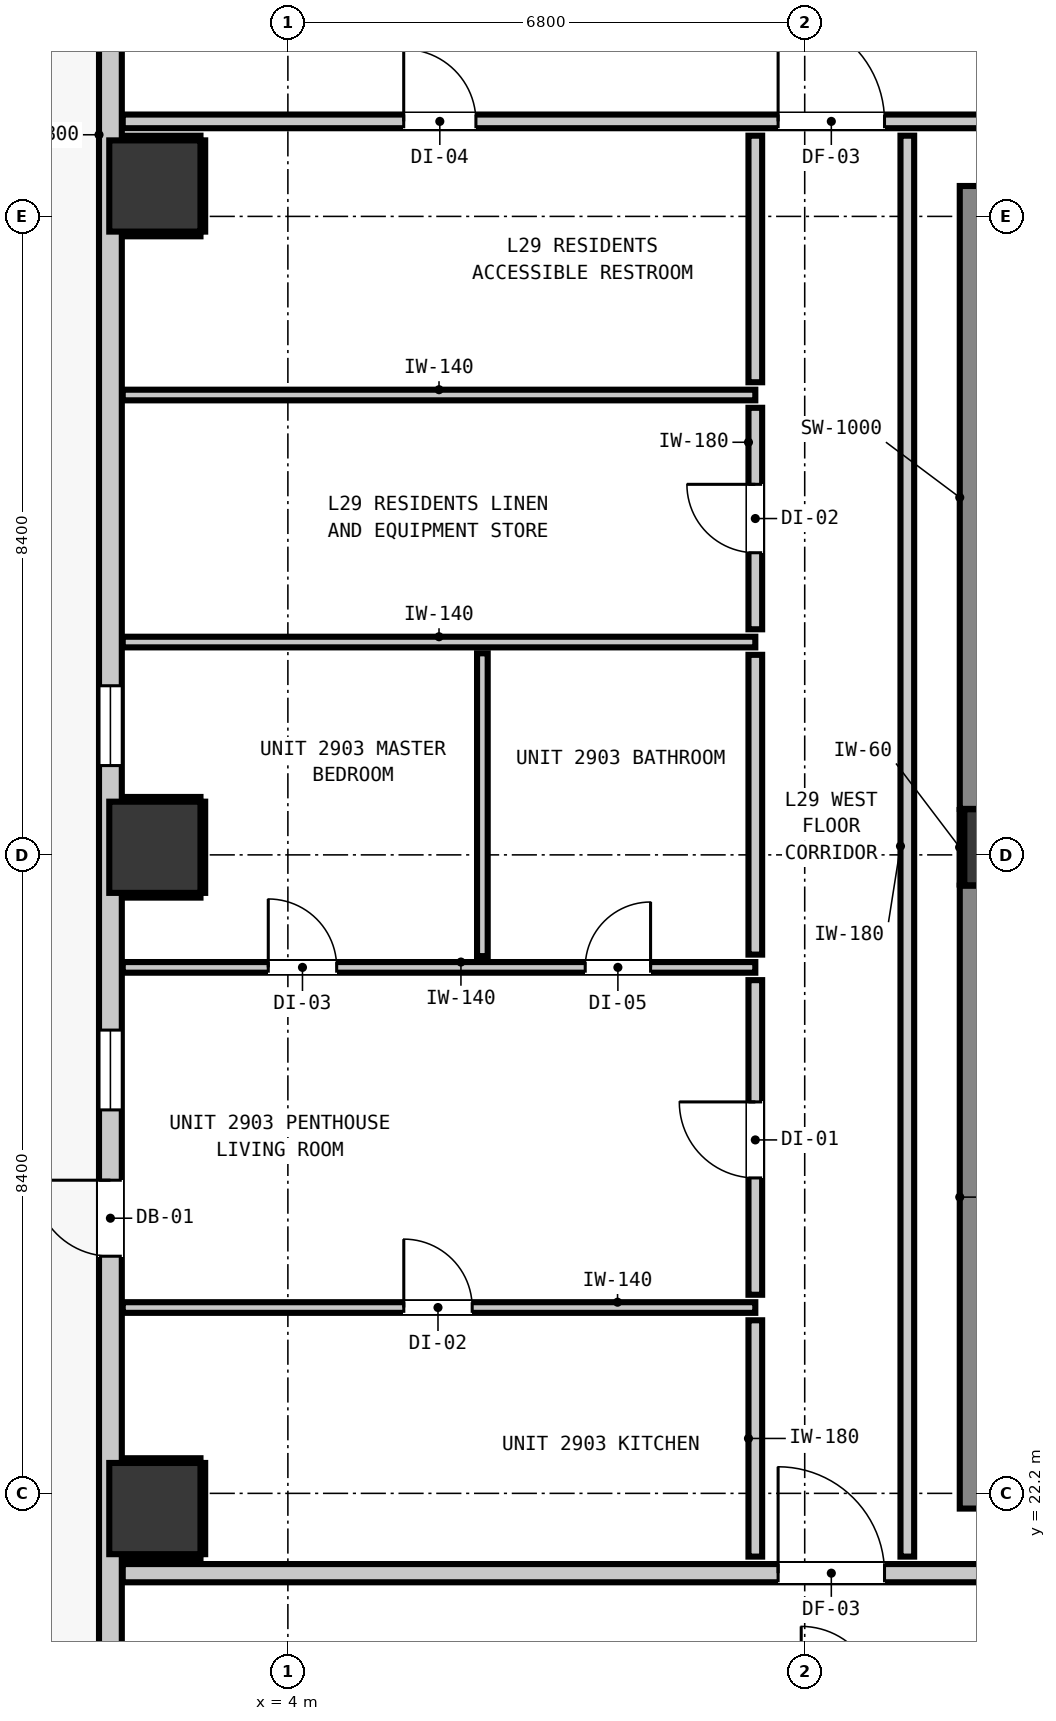
"""IFC4 building model, lengths in metres.
Left out: names, types, materials, properties, quantities, classifications, styles, units other than length and angle.
Written with IfcOpenShell. Run it as: python <this file> out.ifc"""

import sys

from ifc_helpers import new_model, si_unit, direction, frame, frame_2d, origin, origin_2d, place, context, subcontext, project, spatial, rectangle, extrude, element, fill, save


model = new_model("IFC4")
c1 = context("Model", 3, precision=1e-05, world=origin(), true_north=direction((0.0, 1.0)))
c2 = subcontext(c1, "Body", "Model", "MODEL_VIEW")
j1 = project(units=[si_unit("LENGTHUNIT", "METRE"), si_unit("PLANEANGLEUNIT", "RADIAN")], contexts=[c1])
p1 = place(None, origin())
s1 = spatial("IfcSite", under=j1, at=p1, CompositionType="ELEMENT")
p2 = place(p1, origin())
s2 = spatial("IfcBuilding", under=s1, at=p2, CompositionType="ELEMENT")
p3 = place(p2, frame((0.0, 0.0, 102.76)))
s3 = spatial("IfcBuildingStorey", under=s2, at=p3, CompositionType="ELEMENT", Elevation=102.76)
p4 = place(p3, frame((13.4, 30.7, 0.0), z_axis=(0.0, 0.0, 1.0), x_axis=(1.0, 0.0, 0.0)))
e1 = element("IfcColumn", 1, at=p4, inside=s3, PredefinedType="COLUMN", context=c2, shape_type="SweptSolid", body=[
    extrude(rectangle(XDim=1.0, YDim=1.0, at=origin_2d()), origin(), (0.0, 0.0, 1.0), 3.32),
])
p5 = place(p3, frame((13.34, 22.0, 0.0), z_axis=(0.0, 0.0, 1.0), x_axis=(0.0, 1.0, 0.0)))
e2 = element("IfcWall", 2, at=p5, inside=s3, PredefinedType="SHEAR", context=c2, shape_type="SweptSolid", body=[
    extrude(rectangle(XDim=8.195, YDim=1.0, at=frame_2d((4.098, 0.0))), origin(), (0.0, 0.0, 1.0), 3.32),
])
p6 = place(p3, frame((13.34, 31.205, 0.0), z_axis=(0.0, 0.0, 1.0), x_axis=(0.0, 1.0, 0.0)))
e3 = element("IfcWall", 3, at=p6, inside=s3, PredefinedType="SHEAR", context=c2, shape_type="SweptSolid", body=[
    extrude(rectangle(XDim=8.195, YDim=1.0, at=frame_2d((4.097, 0.0))), origin(), (0.0, 0.0, 1.0), 3.32),
])
for number, where, z_axis, x_axis in (
    (4, (2.25, 22.0, 0.0), (0.0, 0.0, 1.0), (1.0, 0.0, 0.0)),
    (5, (2.25, 30.7, 0.0), (0.0, 0.0, 1.0), (1.0, 0.0, 0.0)),
    (6, (2.25, 39.4, 0.0), (0.0, 0.0, 1.0), (1.0, 0.0, 0.0)),
):
    element("IfcColumn", number, at=place(p3, frame(where, z_axis=z_axis, x_axis=x_axis)), inside=s3, PredefinedType="COLUMN", context=c2, shape_type="SweptSolid", body=[
        extrude(rectangle(XDim=1.2, YDim=1.2, at=origin_2d()), origin(), (0.0, 0.0, 1.0), 2.9),
    ])
p7 = place(p3, frame((1.665, 16.365, 0.0), z_axis=(0.0, 0.0, 1.0), x_axis=(0.0, 1.0, 0.0)))
e7 = element("IfcWall", 7, at=p7, inside=s3, PredefinedType="STANDARD", context=c2, shape_type="SweptSolid", body=[
    extrude(rectangle(XDim=34.67, YDim=0.3, at=frame_2d((17.335, 0.0))), origin(), (0.0, 0.0, 1.0), 2.9),
])
p8 = place(p7, frame((8.955, 0.0, 0.0)))
e8 = element("IfcOpeningElement", 8, at=p8, cuts=e7, PredefinedType="OPENING", context=c2, shape_type="SweptSolid", body=[
    extrude(rectangle(XDim=1.0, YDim=2.15, at=frame_2d((0.5, 1.075))), frame((0.0, 0.16, 0.0), z_axis=(0.0, -1.0, 0.0), x_axis=(1.0, 0.0, 0.0)), (0.0, 0.0, 1.0), 0.32),
])
p9 = place(p7, frame((30.958, 0.0, 0.85)))
e9 = element("IfcOpeningElement", 9, at=p9, cuts=e7, PredefinedType="OPENING", context=c2, shape_type="SweptSolid", body=[
    extrude(rectangle(XDim=1.05, YDim=1.65, at=frame_2d((0.525, 0.825))), frame((0.0, 0.16, 0.0), z_axis=(0.0, -1.0, 0.0), x_axis=(1.0, 0.0, 0.0)), (0.0, 0.0, 1.0), 0.32),
])
p10 = place(p7, frame((10.88, 0.0, 0.85)))
e10 = element("IfcOpeningElement", 10, at=p10, cuts=e7, PredefinedType="OPENING", context=c2, shape_type="SweptSolid", body=[
    extrude(rectangle(XDim=1.05, YDim=1.65, at=frame_2d((0.525, 0.825))), frame((0.0, 0.16, 0.0), z_axis=(0.0, -1.0, 0.0), x_axis=(1.0, 0.0, 0.0)), (0.0, 0.0, 1.0), 0.32),
])
p11 = place(p7, frame((15.41, 0.0, 0.85)))
e11 = element("IfcOpeningElement", 11, at=p11, cuts=e7, PredefinedType="OPENING", context=c2, shape_type="SweptSolid", body=[
    extrude(rectangle(XDim=1.05, YDim=1.65, at=frame_2d((0.525, 0.825))), frame((0.0, 0.16, 0.0), z_axis=(0.0, -1.0, 0.0), x_axis=(1.0, 0.0, 0.0)), (0.0, 0.0, 1.0), 0.32),
])
p12 = place(p3, frame((1.827, 21.15, 0.0), z_axis=(0.0, 0.0, 1.0), x_axis=(1.0, 0.0, 0.0)))
e12 = element("IfcWall", 12, at=p12, inside=s3, PredefinedType="PARTITIONING", context=c2, shape_type="SweptSolid", body=[
    extrude(rectangle(XDim=42.146, YDim=0.24, at=frame_2d((21.073, 0.0))), origin(), (0.0, 0.0, 1.0), 2.9),
])
p13 = place(p12, frame((16.383, 0.0, 0.0)))
e13 = element("IfcOpeningElement", 13, at=p13, cuts=e12, PredefinedType="OPENING", context=c2, shape_type="SweptSolid", body=[
    extrude(rectangle(XDim=1.1, YDim=2.15, at=frame_2d((0.55, 1.075))), frame((0.0, 0.13, 0.0), z_axis=(0.0, -1.0, 0.0), x_axis=(1.0, 0.0, 0.0)), (0.0, 0.0, 1.0), 0.26),
])
p14 = place(p12, frame((8.623, 0.0, 0.0)))
e14 = element("IfcOpeningElement", 14, at=p14, cuts=e12, PredefinedType="OPENING", context=c2, shape_type="SweptSolid", body=[
    extrude(rectangle(XDim=1.4, YDim=2.15, at=frame_2d((0.7, 1.075))), frame((0.0, 0.13, 0.0), z_axis=(0.0, -1.0, 0.0), x_axis=(1.0, 0.0, 0.0)), (0.0, 0.0, 1.0), 0.26),
])
p15 = place(p12, frame((36.223, 0.0, 0.0)))
e15 = element("IfcOpeningElement", 15, at=p15, cuts=e12, PredefinedType="OPENING", context=c2, shape_type="SweptSolid", body=[
    extrude(rectangle(XDim=1.4, YDim=2.15, at=frame_2d((0.7, 1.075))), frame((0.0, 0.13, 0.0), z_axis=(0.0, -1.0, 0.0), x_axis=(1.0, 0.0, 0.0)), (0.0, 0.0, 1.0), 0.26),
])
p16 = place(p3, frame((1.827, 40.25, 0.0), z_axis=(0.0, 0.0, 1.0), x_axis=(1.0, 0.0, 0.0)))
e16 = element("IfcWall", 16, at=p16, inside=s3, PredefinedType="PARTITIONING", context=c2, shape_type="SweptSolid", body=[
    extrude(rectangle(XDim=42.146, YDim=0.18, at=frame_2d((21.073, 0.0))), origin(), (0.0, 0.0, 1.0), 2.9),
])
p17 = place(p16, frame((15.608, 0.0, 0.0)))
e17 = element("IfcOpeningElement", 17, at=p17, cuts=e16, PredefinedType="OPENING", context=c2, shape_type="SweptSolid", body=[
    extrude(rectangle(XDim=1.4, YDim=2.15, at=frame_2d((0.7, 1.075))), frame((0.0, 0.1, 0.0), z_axis=(0.0, -1.0, 0.0), x_axis=(1.0, 0.0, 0.0)), (0.0, 0.0, 1.0), 0.2),
])
p18 = place(p16, frame((8.623, 0.0, 0.0)))
e18 = element("IfcOpeningElement", 18, at=p18, cuts=e16, PredefinedType="OPENING", context=c2, shape_type="SweptSolid", body=[
    extrude(rectangle(XDim=1.4, YDim=2.15, at=frame_2d((0.7, 1.075))), frame((0.0, 0.1, 0.0), z_axis=(0.0, -1.0, 0.0), x_axis=(1.0, 0.0, 0.0)), (0.0, 0.0, 1.0), 0.2),
])
p19 = place(p16, frame((36.223, 0.0, 0.0)))
e19 = element("IfcOpeningElement", 19, at=p19, cuts=e16, PredefinedType="OPENING", context=c2, shape_type="SweptSolid", body=[
    extrude(rectangle(XDim=1.4, YDim=2.15, at=frame_2d((0.7, 1.075))), frame((0.0, 0.1, 0.0), z_axis=(0.0, -1.0, 0.0), x_axis=(1.0, 0.0, 0.0)), (0.0, 0.0, 1.0), 0.2),
])
p20 = place(p16, frame((3.697, 0.0, 0.0)))
e20 = element("IfcOpeningElement", 20, at=p20, cuts=e16, PredefinedType="OPENING", context=c2, shape_type="SweptSolid", body=[
    extrude(rectangle(XDim=0.95, YDim=2.1, at=frame_2d((0.475, 1.05))), frame((0.0, 0.1, 0.0), z_axis=(0.0, -1.0, 0.0), x_axis=(1.0, 0.0, 0.0)), (0.0, 0.0, 1.0), 0.2),
])
p21 = place(p16, frame((39.574, 0.0, 0.0)))
e21 = element("IfcOpeningElement", 21, at=p21, cuts=e16, PredefinedType="OPENING", context=c2, shape_type="SweptSolid", body=[
    extrude(rectangle(XDim=0.9, YDim=2.1, at=frame_2d((0.45, 1.05))), frame((0.0, 0.1, 0.0), z_axis=(0.0, -1.0, 0.0), x_axis=(1.0, 0.0, 0.0)), (0.0, 0.0, 1.0), 0.2),
])
p22 = place(p3, frame((1.827, 24.645, 0.0), z_axis=(0.0, 0.0, 1.0), x_axis=(1.0, 0.0, 0.0)))
e22 = element("IfcWall", 22, at=p22, inside=s3, PredefinedType="PARTITIONING", context=c2, shape_type="SweptSolid", body=[
    extrude(rectangle(XDim=8.323, YDim=0.14, at=frame_2d((4.162, 0.0))), origin(), (0.0, 0.0, 1.0), 2.9),
])
p23 = place(p22, frame((3.698, 0.0, 0.0)))
e23 = element("IfcOpeningElement", 23, at=p23, cuts=e22, PredefinedType="OPENING", context=c2, shape_type="SweptSolid", body=[
    extrude(rectangle(XDim=0.9, YDim=2.1, at=frame_2d((0.45, 1.05))), frame((0.0, 0.08, 0.0), z_axis=(0.0, -1.0, 0.0), x_axis=(1.0, 0.0, 0.0)), (0.0, 0.0, 1.0), 0.16),
])
p24 = place(p3, frame((1.827, 29.12, 0.0), z_axis=(0.0, 0.0, 1.0), x_axis=(1.0, 0.0, 0.0)))
e24 = element("IfcWall", 24, at=p24, inside=s3, PredefinedType="PARTITIONING", context=c2, shape_type="SweptSolid", body=[
    extrude(rectangle(XDim=8.323, YDim=0.14, at=frame_2d((4.162, 0.0))), origin(), (0.0, 0.0, 1.0), 2.9),
])
p25 = place(p24, frame((6.085, 0.0, 0.0)))
e25 = element("IfcOpeningElement", 25, at=p25, cuts=e24, PredefinedType="OPENING", context=c2, shape_type="SweptSolid", body=[
    extrude(rectangle(XDim=0.86, YDim=2.02, at=frame_2d((0.43, 1.01))), frame((0.0, 0.08, 0.0), z_axis=(0.0, -1.0, 0.0), x_axis=(1.0, 0.0, 0.0)), (0.0, 0.0, 1.0), 0.16),
])
p26 = place(p24, frame((1.915, 0.0, 0.0)))
e26 = element("IfcOpeningElement", 26, at=p26, cuts=e24, PredefinedType="OPENING", context=c2, shape_type="SweptSolid", body=[
    extrude(rectangle(XDim=0.9, YDim=2.1, at=frame_2d((0.45, 1.05))), frame((0.0, 0.08, 0.0), z_axis=(0.0, -1.0, 0.0), x_axis=(1.0, 0.0, 0.0)), (0.0, 0.0, 1.0), 0.16),
])
for number, where, z_axis, x_axis in (
    (27, (1.827, 33.4, 0.0), (0.0, 0.0, 1.0), (1.0, 0.0, 0.0)),
    (28, (1.827, 36.65, 0.0), (0.0, 0.0, 1.0), (1.0, 0.0, 0.0)),
):
    element("IfcWall", number, at=place(p3, frame(where, z_axis=z_axis, x_axis=x_axis)), inside=s3, PredefinedType="PARTITIONING", context=c2, shape_type="SweptSolid", body=[
        extrude(rectangle(XDim=8.323, YDim=0.14, at=frame_2d((4.162, 0.0))), origin(), (0.0, 0.0, 1.0), 2.9),
    ])
p27 = place(p3, frame((10.15, 21.368, 0.0), z_axis=(0.0, 0.0, 1.0), x_axis=(0.0, 1.0, 0.0)))
e29 = element("IfcWall", 29, at=p27, inside=s3, PredefinedType="PARTITIONING", context=c2, shape_type="SweptSolid", body=[
    extrude(rectangle(XDim=3.109, YDim=0.18, at=frame_2d((1.555, 0.0))), origin(), (0.0, 0.0, 1.0), 2.9),
])
p28 = place(p3, frame((10.15, 24.813, 0.0), z_axis=(0.0, 0.0, 1.0), x_axis=(0.0, 1.0, 0.0)))
e30 = element("IfcWall", 30, at=p28, inside=s3, PredefinedType="PARTITIONING", context=c2, shape_type="SweptSolid", body=[
    extrude(rectangle(XDim=4.139, YDim=0.18, at=frame_2d((2.069, 0.0))), origin(), (0.0, 0.0, 1.0), 2.9),
])
p29 = place(p28, frame((1.537, 0.0, 0.0)))
e31 = element("IfcOpeningElement", 31, at=p29, cuts=e30, PredefinedType="OPENING", context=c2, shape_type="SweptSolid", body=[
    extrude(rectangle(XDim=1.0, YDim=2.15, at=frame_2d((0.5, 1.075))), frame((0.0, 0.1, 0.0), z_axis=(0.0, -1.0, 0.0), x_axis=(1.0, 0.0, 0.0)), (0.0, 0.0, 1.0), 0.2),
])
p30 = place(p3, frame((10.15, 29.288, 0.0), z_axis=(0.0, 0.0, 1.0), x_axis=(0.0, 1.0, 0.0)))
e32 = element("IfcWall", 32, at=p30, inside=s3, PredefinedType="PARTITIONING", context=c2, shape_type="SweptSolid", body=[
    extrude(rectangle(XDim=3.944, YDim=0.18, at=frame_2d((1.972, 0.0))), origin(), (0.0, 0.0, 1.0), 2.9),
])
p31 = place(p3, frame((10.15, 33.568, 0.0), z_axis=(0.0, 0.0, 1.0), x_axis=(0.0, 1.0, 0.0)))
e33 = element("IfcWall", 33, at=p31, inside=s3, PredefinedType="PARTITIONING", context=c2, shape_type="SweptSolid", body=[
    extrude(rectangle(XDim=2.914, YDim=0.18, at=frame_2d((1.457, 0.0))), origin(), (0.0, 0.0, 1.0), 2.9),
])
p32 = place(p31, frame((1.007, 0.0, 0.0)))
e34 = element("IfcOpeningElement", 34, at=p32, cuts=e33, PredefinedType="OPENING", context=c2, shape_type="SweptSolid", body=[
    extrude(rectangle(XDim=0.9, YDim=2.1, at=frame_2d((0.45, 1.05))), frame((0.0, 0.1, 0.0), z_axis=(0.0, -1.0, 0.0), x_axis=(1.0, 0.0, 0.0)), (0.0, 0.0, 1.0), 0.2),
])
p33 = place(p3, frame((10.15, 36.818, 0.0), z_axis=(0.0, 0.0, 1.0), x_axis=(0.0, 1.0, 0.0)))
e35 = element("IfcWall", 35, at=p33, inside=s3, PredefinedType="PARTITIONING", context=c2, shape_type="SweptSolid", body=[
    extrude(rectangle(XDim=3.244, YDim=0.18, at=frame_2d((1.622, 0.0))), origin(), (0.0, 0.0, 1.0), 2.9),
])
p34 = place(p3, frame((12.15, 21.368, 0.0), z_axis=(0.0, 0.0, 1.0), x_axis=(0.0, 1.0, 0.0)))
e36 = element("IfcWall", 36, at=p34, inside=s3, PredefinedType="PARTITIONING", context=c2, shape_type="SweptSolid", body=[
    extrude(rectangle(XDim=18.694, YDim=0.18, at=frame_2d((9.347, 0.0))), origin(), (0.0, 0.0, 1.0), 2.9),
])
p35 = place(p3, frame((6.559, 29.268, 0.0), z_axis=(0.0, 0.0, 1.0), x_axis=(0.0, 1.0, 0.0)))
e37 = element("IfcWall", 37, at=p35, inside=s3, PredefinedType="PARTITIONING", context=c2, shape_type="SweptSolid", body=[
    extrude(rectangle(XDim=3.984, YDim=0.14, at=frame_2d((1.992, 0.0))), origin(), (0.0, 0.0, 1.0), 2.9),
])
p36 = place(p3, frame((12.868, 30.21, 0.0), z_axis=(0.0, 0.0, 1.0), x_axis=(0.0, 1.0, 0.0)))
e38 = element("IfcWall", 38, at=p36, inside=s3, PredefinedType="PARTITIONING", context=c2, shape_type="SweptSolid", body=[
    extrude(rectangle(XDim=0.98, YDim=0.06, at=frame_2d((0.49, 0.0))), origin(), (0.0, 0.0, 1.0), 0.905),
])
for number, where, z_axis, x_axis in (
    (39, (1.83, 21.368, 0.0), (0.0, 0.0, 1.0), (1.0, 0.0, 0.0)),
    (40, (1.83, 22.632, 0.0), (0.0, 0.0, 1.0), (1.0, 0.0, 0.0)),
):
    element("IfcWall", number, at=place(p3, frame(where, z_axis=z_axis, x_axis=x_axis)), inside=s3, PredefinedType="PARTITIONING", context=c2, shape_type="SweptSolid", body=[
        extrude(rectangle(XDim=1.02, YDim=0.06, at=frame_2d((0.51, 0.0))), origin(), (0.0, 0.0, 1.0), 0.905),
    ])
p37 = place(p3, frame((2.882, 21.4, 0.0), z_axis=(0.0, 0.0, 1.0), x_axis=(0.0, 1.0, 0.0)))
e41 = element("IfcWall", 41, at=p37, inside=s3, PredefinedType="PARTITIONING", context=c2, shape_type="SweptSolid", body=[
    extrude(rectangle(XDim=1.2, YDim=0.06, at=frame_2d((0.6, 0.0))), origin(), (0.0, 0.0, 1.0), 1.45),
])
for number, where, z_axis, x_axis in (
    (42, (1.83, 30.068, 0.0), (0.0, 0.0, 1.0), (1.0, 0.0, 0.0)),
    (43, (1.83, 31.332, 0.0), (0.0, 0.0, 1.0), (1.0, 0.0, 0.0)),
):
    element("IfcWall", number, at=place(p3, frame(where, z_axis=z_axis, x_axis=x_axis)), inside=s3, PredefinedType="PARTITIONING", context=c2, shape_type="SweptSolid", body=[
        extrude(rectangle(XDim=1.02, YDim=0.06, at=frame_2d((0.51, 0.0))), origin(), (0.0, 0.0, 1.0), 0.905),
    ])
p38 = place(p3, frame((2.882, 30.1, 0.0), z_axis=(0.0, 0.0, 1.0), x_axis=(0.0, 1.0, 0.0)))
e44 = element("IfcWall", 44, at=p38, inside=s3, PredefinedType="PARTITIONING", context=c2, shape_type="SweptSolid", body=[
    extrude(rectangle(XDim=1.2, YDim=0.06, at=frame_2d((0.6, 0.0))), origin(), (0.0, 0.0, 1.0), 1.45),
])
for number, where, z_axis, x_axis in (
    (45, (1.83, 38.768, 0.0), (0.0, 0.0, 1.0), (1.0, 0.0, 0.0)),
    (46, (1.83, 40.032, 0.0), (0.0, 0.0, 1.0), (1.0, 0.0, 0.0)),
):
    element("IfcWall", number, at=place(p3, frame(where, z_axis=z_axis, x_axis=x_axis)), inside=s3, PredefinedType="PARTITIONING", context=c2, shape_type="SweptSolid", body=[
        extrude(rectangle(XDim=1.02, YDim=0.06, at=frame_2d((0.51, 0.0))), origin(), (0.0, 0.0, 1.0), 0.905),
    ])
p39 = place(p3, frame((2.882, 38.8, 0.0), z_axis=(0.0, 0.0, 1.0), x_axis=(0.0, 1.0, 0.0)))
e47 = element("IfcWall", 47, at=p39, inside=s3, PredefinedType="PARTITIONING", context=c2, shape_type="SweptSolid", body=[
    extrude(rectangle(XDim=1.2, YDim=0.06, at=frame_2d((0.6, 0.0))), origin(), (0.0, 0.0, 1.0), 1.45),
])
p40 = place(p8, origin())
e48 = element("IfcDoor", 48, at=p40, inside=s3, OperationType="SINGLE_SWING_RIGHT", PredefinedType="DOOR", context=c2, shape_type="SweptSolid", body=[
    extrude(rectangle(XDim=1.0, YDim=2.15, at=frame_2d((0.5, 1.075))), frame((0.0, 0.025, 0.0), z_axis=(0.0, -1.0, 0.0), x_axis=(1.0, 0.0, 0.0)), (0.0, 0.0, 1.0), 0.05),
])
fill(e8, e48)
p41 = place(p10, origin())
e49 = element("IfcWindow", 49, at=p41, inside=s3, PartitioningType="SINGLE_PANEL", PredefinedType="WINDOW", context=c2, shape_type="SweptSolid", body=[
    extrude(rectangle(XDim=1.05, YDim=1.65, at=frame_2d((0.525, 0.825))), frame((0.0, 0.03, 0.0), z_axis=(0.0, -1.0, 0.0), x_axis=(1.0, 0.0, 0.0)), (0.0, 0.0, 1.0), 0.06),
])
fill(e10, e49)
p42 = place(p11, origin())
e50 = element("IfcWindow", 50, at=p42, inside=s3, PartitioningType="SINGLE_PANEL", PredefinedType="WINDOW", context=c2, shape_type="SweptSolid", body=[
    extrude(rectangle(XDim=1.05, YDim=1.65, at=frame_2d((0.525, 0.825))), frame((0.0, 0.03, 0.0), z_axis=(0.0, -1.0, 0.0), x_axis=(1.0, 0.0, 0.0)), (0.0, 0.0, 1.0), 0.06),
])
fill(e11, e50)
p43 = place(p14, origin())
e51 = element("IfcDoor", 51, at=p43, inside=s3, OperationType="SINGLE_SWING_LEFT", PredefinedType="DOOR", context=c2, shape_type="SweptSolid", body=[
    extrude(rectangle(XDim=1.4, YDim=2.15, at=frame_2d((0.7, 1.075))), frame((0.0, 0.025, 0.0), z_axis=(0.0, -1.0, 0.0), x_axis=(1.0, 0.0, 0.0)), (0.0, 0.0, 1.0), 0.05),
])
fill(e14, e51)
p44 = place(p18, origin())
e52 = element("IfcDoor", 52, at=p44, inside=s3, OperationType="SINGLE_SWING_LEFT", PredefinedType="DOOR", context=c2, shape_type="SweptSolid", body=[
    extrude(rectangle(XDim=1.4, YDim=2.15, at=frame_2d((0.7, 1.075))), frame((0.0, 0.025, 0.0), z_axis=(0.0, -1.0, 0.0), x_axis=(1.0, 0.0, 0.0)), (0.0, 0.0, 1.0), 0.05),
])
fill(e18, e52)
p45 = place(p29, origin())
e53 = element("IfcDoor", 53, at=p45, inside=s3, OperationType="SINGLE_SWING_RIGHT", PredefinedType="DOOR", context=c2, shape_type="SweptSolid", body=[
    extrude(rectangle(XDim=1.0, YDim=2.15, at=frame_2d((0.5, 1.075))), frame((0.0, 0.025, 0.0), z_axis=(0.0, -1.0, 0.0), x_axis=(1.0, 0.0, 0.0)), (0.0, 0.0, 1.0), 0.05),
])
fill(e31, e53)
p46 = place(p23, origin())
e54 = element("IfcDoor", 54, at=p46, inside=s3, OperationType="SINGLE_SWING_LEFT", PredefinedType="DOOR", context=c2, shape_type="SweptSolid", body=[
    extrude(rectangle(XDim=0.9, YDim=2.1, at=frame_2d((0.45, 1.05))), frame((0.0, 0.025, 0.0), z_axis=(0.0, -1.0, 0.0), x_axis=(1.0, 0.0, 0.0)), (0.0, 0.0, 1.0), 0.05),
])
fill(e23, e54)
p47 = place(p25, origin())
e55 = element("IfcDoor", 55, at=p47, inside=s3, OperationType="SINGLE_SWING_RIGHT", PredefinedType="DOOR", context=c2, shape_type="SweptSolid", body=[
    extrude(rectangle(XDim=0.86, YDim=2.02, at=frame_2d((0.43, 1.01))), frame((0.0, 0.025, 0.0), z_axis=(0.0, -1.0, 0.0), x_axis=(1.0, 0.0, 0.0)), (0.0, 0.0, 1.0), 0.05),
])
fill(e25, e55)
p48 = place(p26, origin())
e56 = element("IfcDoor", 56, at=p48, inside=s3, OperationType="SINGLE_SWING_LEFT", PredefinedType="DOOR", context=c2, shape_type="SweptSolid", body=[
    extrude(rectangle(XDim=0.9, YDim=2.1, at=frame_2d((0.45, 1.05))), frame((0.0, 0.025, 0.0), z_axis=(0.0, -1.0, 0.0), x_axis=(1.0, 0.0, 0.0)), (0.0, 0.0, 1.0), 0.05),
])
fill(e26, e56)
p49 = place(p32, origin())
e57 = element("IfcDoor", 57, at=p49, inside=s3, OperationType="SINGLE_SWING_RIGHT", PredefinedType="DOOR", context=c2, shape_type="SweptSolid", body=[
    extrude(rectangle(XDim=0.9, YDim=2.1, at=frame_2d((0.45, 1.05))), frame((0.0, 0.025, 0.0), z_axis=(0.0, -1.0, 0.0), x_axis=(1.0, 0.0, 0.0)), (0.0, 0.0, 1.0), 0.05),
])
fill(e34, e57)
p50 = place(p20, origin())
e58 = element("IfcDoor", 58, at=p50, inside=s3, OperationType="SINGLE_SWING_LEFT", PredefinedType="DOOR", context=c2, shape_type="SweptSolid", body=[
    extrude(rectangle(XDim=0.95, YDim=2.1, at=frame_2d((0.475, 1.05))), frame((0.0, 0.025, 0.0), z_axis=(0.0, -1.0, 0.0), x_axis=(1.0, 0.0, 0.0)), (0.0, 0.0, 1.0), 0.05),
])
fill(e20, e58)
save(model, sys.argv[1])
